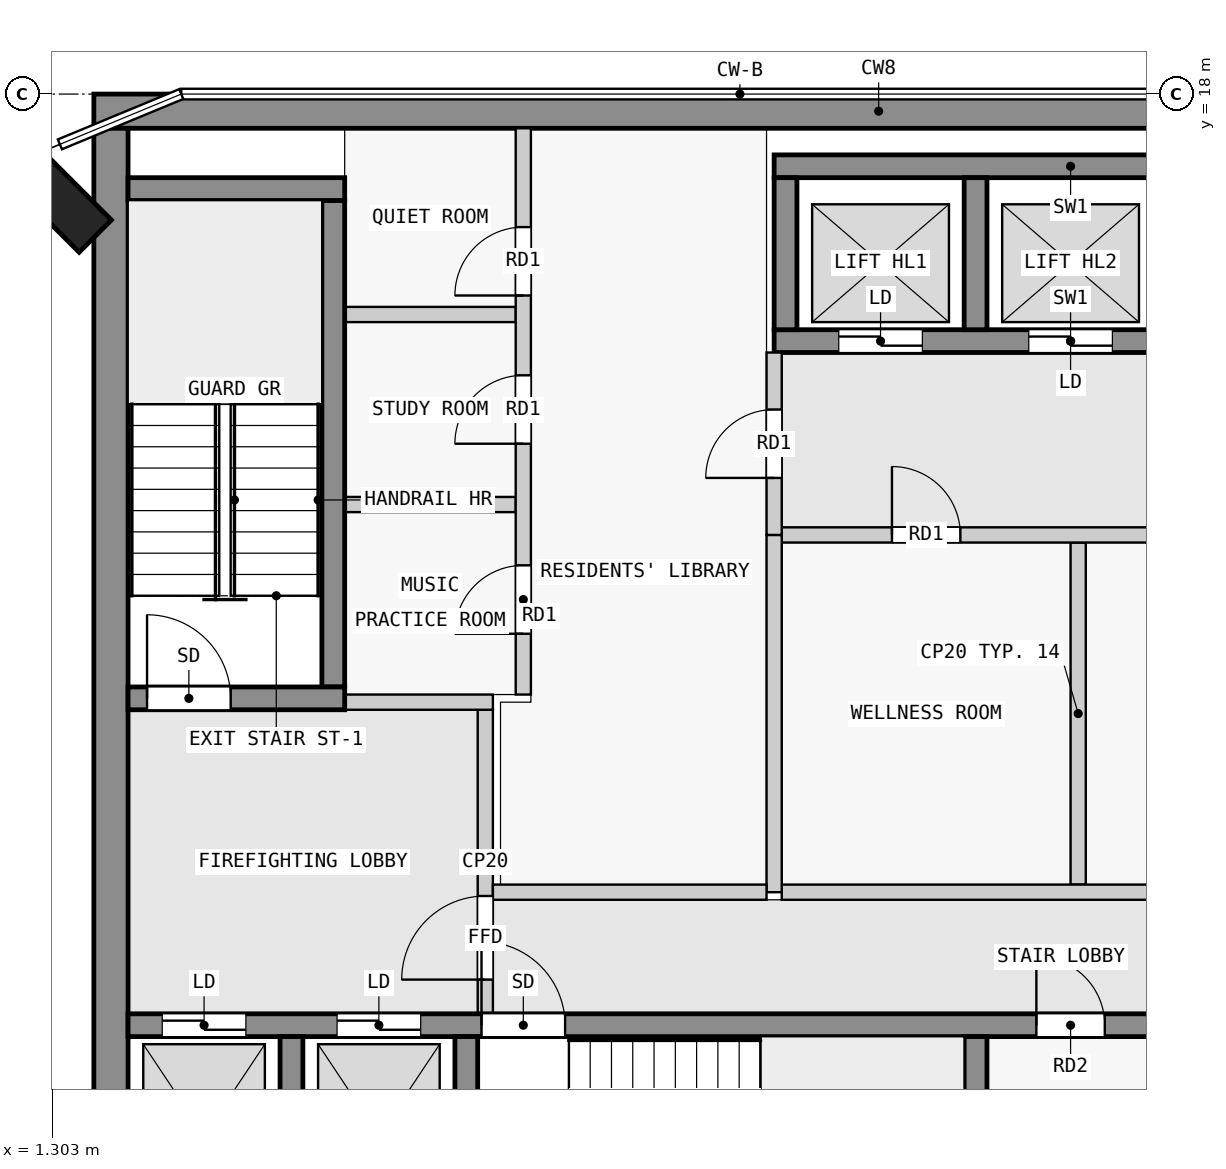
"""IFC4 building model, lengths in metres.
Left out: names, types, materials, properties, quantities, classifications, styles, units other than length and angle.
Written with IfcOpenShell. Run it as: python <this file> out.ifc"""

import sys

from ifc_helpers import new_model, si_unit, direction, frame, frame_2d, origin, origin_2d, place, context, subcontext, project, spatial, rectangle, extrude, element, fill, save


model = new_model("IFC4")
c1 = context("Model", 3, precision=1e-05, world=origin(), true_north=direction((0.0, 1.0)))
c2 = subcontext(c1, "Body", "Model", "MODEL_VIEW")
j1 = project(units=[si_unit("LENGTHUNIT", "METRE"), si_unit("PLANEANGLEUNIT", "RADIAN")], contexts=[c1])
p1 = place(None, origin())
s1 = spatial("IfcSite", under=j1, at=p1, CompositionType="ELEMENT")
p2 = place(p1, origin())
s2 = spatial("IfcBuilding", under=s1, at=p2, CompositionType="ELEMENT")
p3 = place(p2, frame((0.0, 0.0, 263.4)))
s3 = spatial("IfcBuildingStorey", under=s2, at=p3, CompositionType="ELEMENT", Elevation=263.4)
p4 = place(p3, frame((1.374, 16.626, 0.0), z_axis=(0.0, 0.0, 1.0), x_axis=(0.707106781187, 0.707106781187, 0.0)))
e1 = element("IfcColumn", 1, at=p4, inside=s3, PredefinedType="COLUMN", context=c2, shape_type="SweptSolid", body=[
    extrude(rectangle(XDim=0.6, YDim=1.4, at=origin_2d()), origin(), (0.0, 0.0, 1.0), 3.5),
])
p5 = place(p3, frame((1.85, 17.775, 0.0), z_axis=(0.0, 0.0, 1.0), x_axis=(1.0, 0.0, 0.0)))
e2 = element("IfcWall", 2, at=p5, inside=s3, PredefinedType="SHEAR", context=c2, shape_type="SweptSolid", body=[
    extrude(rectangle(XDim=20.65, YDim=0.45, at=frame_2d((10.325, 0.0))), origin(), (0.0, 0.0, 1.0), 3.25),
])
p6 = place(p3, frame((2.075, 2.5, 0.0), z_axis=(0.0, 0.0, 1.0), x_axis=(0.0, 1.0, 0.0)))
e3 = element("IfcWall", 3, at=p6, inside=s3, PredefinedType="SHEAR", context=c2, shape_type="SweptSolid", body=[
    extrude(rectangle(XDim=15.05, YDim=0.45, at=frame_2d((7.525, 0.0))), origin(), (0.0, 0.0, 1.0), 3.25),
])
for number, where, z_axis, x_axis in (
    (4, (4.45, 2.8, 0.0), (0.0, 0.0, 1.0), (0.0, 1.0, 0.0)),
    (5, (6.75, 2.8, 0.0), (0.0, 0.0, 1.0), (0.0, 1.0, 0.0)),
    (6, (13.45, 2.8, 0.0), (0.0, 0.0, 1.0), (0.0, 1.0, 0.0)),
):
    element("IfcWall", number, at=place(p3, frame(where, z_axis=z_axis, x_axis=x_axis)), inside=s3, PredefinedType="SHEAR", context=c2, shape_type="SweptSolid", body=[
        extrude(rectangle(XDim=2.8, YDim=0.3, at=frame_2d((1.4, 0.0))), origin(), (0.0, 0.0, 1.0), 3.25),
    ])
p7 = place(p3, frame((2.3, 5.75, 0.0), z_axis=(0.0, 0.0, 1.0), x_axis=(1.0, 0.0, 0.0)))
e7 = element("IfcWall", 7, at=p7, inside=s3, PredefinedType="SHEAR", context=c2, shape_type="SweptSolid", body=[
    extrude(rectangle(XDim=18.8, YDim=0.3, at=frame_2d((9.4, 0.0))), origin(), (0.0, 0.0, 1.0), 3.25),
])
p8 = place(p7, frame((4.65, 0.0, 0.0)))
e8 = element("IfcOpeningElement", 8, at=p8, cuts=e7, PredefinedType="OPENING", context=c2, shape_type="SweptSolid", body=[
    extrude(rectangle(XDim=1.1, YDim=2.1, at=frame_2d((0.55, 1.05))), frame((0.0, 0.16, 0.0), z_axis=(0.0, -1.0, 0.0), x_axis=(1.0, 0.0, 0.0)), (0.0, 0.0, 1.0), 0.32),
])
p9 = place(p7, frame((0.45, 0.0, 0.0)))
e9 = element("IfcOpeningElement", 9, at=p9, cuts=e7, PredefinedType="OPENING", context=c2, shape_type="SweptSolid", body=[
    extrude(rectangle(XDim=1.1, YDim=2.1, at=frame_2d((0.55, 1.05))), frame((0.0, 0.16, 0.0), z_axis=(0.0, -1.0, 0.0), x_axis=(1.0, 0.0, 0.0)), (0.0, 0.0, 1.0), 0.32),
])
p10 = place(p7, frame((2.75, 0.0, 0.0)))
e10 = element("IfcOpeningElement", 10, at=p10, cuts=e7, PredefinedType="OPENING", context=c2, shape_type="SweptSolid", body=[
    extrude(rectangle(XDim=1.1, YDim=2.1, at=frame_2d((0.55, 1.05))), frame((0.0, 0.16, 0.0), z_axis=(0.0, -1.0, 0.0), x_axis=(1.0, 0.0, 0.0)), (0.0, 0.0, 1.0), 0.32),
])
p11 = place(p7, frame((11.95, 0.0, 0.0)))
e11 = element("IfcOpeningElement", 11, at=p11, cuts=e7, PredefinedType="OPENING", context=c2, shape_type="SweptSolid", body=[
    extrude(rectangle(XDim=0.9, YDim=2.1, at=frame_2d((0.45, 1.05))), frame((0.0, 0.16, 0.0), z_axis=(0.0, -1.0, 0.0), x_axis=(1.0, 0.0, 0.0)), (0.0, 0.0, 1.0), 0.32),
])
p12 = place(p7, frame((15.7, 0.0, 0.0)))
e12 = element("IfcOpeningElement", 12, at=p12, cuts=e7, PredefinedType="OPENING", context=c2, shape_type="SweptSolid", body=[
    extrude(rectangle(XDim=0.9, YDim=2.1, at=frame_2d((0.45, 1.05))), frame((0.0, 0.16, 0.0), z_axis=(0.0, -1.0, 0.0), x_axis=(1.0, 0.0, 0.0)), (0.0, 0.0, 1.0), 0.32),
])
p13 = place(p3, frame((2.3, 10.05, 0.0), z_axis=(0.0, 0.0, 1.0), x_axis=(1.0, 0.0, 0.0)))
e13 = element("IfcWall", 13, at=p13, inside=s3, PredefinedType="SHEAR", context=c2, shape_type="SweptSolid", body=[
    extrude(rectangle(XDim=2.85, YDim=0.3, at=frame_2d((1.425, 0.0))), origin(), (0.0, 0.0, 1.0), 3.25),
])
p14 = place(p13, frame((0.25, 0.0, 0.0)))
e14 = element("IfcOpeningElement", 14, at=p14, cuts=e13, PredefinedType="OPENING", context=c2, shape_type="SweptSolid", body=[
    extrude(rectangle(XDim=1.1, YDim=2.1, at=frame_2d((0.55, 1.05))), frame((0.0, 0.16, 0.0), z_axis=(0.0, -1.0, 0.0), x_axis=(1.0, 0.0, 0.0)), (0.0, 0.0, 1.0), 0.32),
])
p15 = place(p3, frame((5.0, 10.2, 0.0), z_axis=(0.0, 0.0, 1.0), x_axis=(0.0, 1.0, 0.0)))
e15 = element("IfcWall", 15, at=p15, inside=s3, PredefinedType="SHEAR", context=c2, shape_type="SweptSolid", body=[
    extrude(rectangle(XDim=6.4, YDim=0.3, at=frame_2d((3.2, 0.0))), origin(), (0.0, 0.0, 1.0), 3.25),
])
p16 = place(p3, frame((2.3, 16.75, 0.0), z_axis=(0.0, 0.0, 1.0), x_axis=(1.0, 0.0, 0.0)))
e16 = element("IfcWall", 16, at=p16, inside=s3, PredefinedType="SHEAR", context=c2, shape_type="SweptSolid", body=[
    extrude(rectangle(XDim=2.85, YDim=0.3, at=frame_2d((1.425, 0.0))), origin(), (0.0, 0.0, 1.0), 3.25),
])
p17 = place(p3, frame((10.8, 17.05, 0.0), z_axis=(0.0, 0.0, 1.0), x_axis=(1.0, 0.0, 0.0)))
e17 = element("IfcWall", 17, at=p17, inside=s3, PredefinedType="SHEAR", context=c2, shape_type="SweptSolid", body=[
    extrude(rectangle(XDim=7.8, YDim=0.3, at=frame_2d((3.9, 0.0))), origin(), (0.0, 0.0, 1.0), 3.25),
])
p18 = place(p3, frame((10.8, 14.75, 0.0), z_axis=(0.0, 0.0, 1.0), x_axis=(1.0, 0.0, 0.0)))
e18 = element("IfcWall", 18, at=p18, inside=s3, PredefinedType="SHEAR", context=c2, shape_type="SweptSolid", body=[
    extrude(rectangle(XDim=7.8, YDim=0.3, at=frame_2d((3.9, 0.0))), origin(), (0.0, 0.0, 1.0), 3.25),
])
p19 = place(p18, frame((0.85, 0.0, 0.0)))
e19 = element("IfcOpeningElement", 19, at=p19, cuts=e18, PredefinedType="OPENING", context=c2, shape_type="SweptSolid", body=[
    extrude(rectangle(XDim=1.1, YDim=2.1, at=frame_2d((0.55, 1.05))), frame((0.0, 0.16, 0.0), z_axis=(0.0, -1.0, 0.0), x_axis=(1.0, 0.0, 0.0)), (0.0, 0.0, 1.0), 0.32),
])
p20 = place(p18, frame((3.35, 0.0, 0.0)))
e20 = element("IfcOpeningElement", 20, at=p20, cuts=e18, PredefinedType="OPENING", context=c2, shape_type="SweptSolid", body=[
    extrude(rectangle(XDim=1.1, YDim=2.1, at=frame_2d((0.55, 1.05))), frame((0.0, 0.16, 0.0), z_axis=(0.0, -1.0, 0.0), x_axis=(1.0, 0.0, 0.0)), (0.0, 0.0, 1.0), 0.32),
])
p21 = place(p18, frame((5.85, 0.0, 0.0)))
e21 = element("IfcOpeningElement", 21, at=p21, cuts=e18, PredefinedType="OPENING", context=c2, shape_type="SweptSolid", body=[
    extrude(rectangle(XDim=1.1, YDim=2.1, at=frame_2d((0.55, 1.05))), frame((0.0, 0.16, 0.0), z_axis=(0.0, -1.0, 0.0), x_axis=(1.0, 0.0, 0.0)), (0.0, 0.0, 1.0), 0.32),
])
for number, where, z_axis, x_axis in (
    (22, (10.95, 14.9, 0.0), (0.0, 0.0, 1.0), (0.0, 1.0, 0.0)),
    (23, (13.45, 14.9, 0.0), (0.0, 0.0, 1.0), (0.0, 1.0, 0.0)),
):
    element("IfcWall", number, at=place(p3, frame(where, z_axis=z_axis, x_axis=x_axis)), inside=s3, PredefinedType="SHEAR", context=c2, shape_type="SweptSolid", body=[
        extrude(rectangle(XDim=2.0, YDim=0.3, at=frame_2d((1.0, 0.0))), origin(), (0.0, 0.0, 1.0), 3.25),
    ])
p22 = place(p3, frame((7.0, 5.9, 0.0), z_axis=(0.0, 0.0, 1.0), x_axis=(0.0, 1.0, 0.0)))
e24 = element("IfcWall", 24, at=p22, inside=s3, PredefinedType="PARTITIONING", context=c2, shape_type="SweptSolid", body=[
    extrude(rectangle(XDim=4.0, YDim=0.2, at=frame_2d((2.0, 0.0))), origin(), (0.0, 0.0, 1.0), 3.25),
])
p23 = place(p22, frame((0.45, 0.0, 0.0)))
e25 = element("IfcOpeningElement", 25, at=p23, cuts=e24, PredefinedType="OPENING", context=c2, shape_type="SweptSolid", body=[
    extrude(rectangle(XDim=1.1, YDim=2.1, at=frame_2d((0.55, 1.05))), frame((0.0, 0.11, 0.0), z_axis=(0.0, -1.0, 0.0), x_axis=(1.0, 0.0, 0.0)), (0.0, 0.0, 1.0), 0.22),
])
p24 = place(p3, frame((5.15, 10.0, 0.0), z_axis=(0.0, 0.0, 1.0), x_axis=(1.0, 0.0, 0.0)))
e26 = element("IfcWall", 26, at=p24, inside=s3, PredefinedType="PARTITIONING", context=c2, shape_type="SweptSolid", body=[
    extrude(rectangle(XDim=1.95, YDim=0.2, at=frame_2d((0.975, 0.0))), origin(), (0.0, 0.0, 1.0), 3.25),
])
p25 = place(p3, frame((7.1, 7.5, 0.0), z_axis=(0.0, 0.0, 1.0), x_axis=(1.0, 0.0, 0.0)))
e27 = element("IfcWall", 27, at=p25, inside=s3, PredefinedType="PARTITIONING", context=c2, shape_type="SweptSolid", body=[
    extrude(rectangle(XDim=3.6, YDim=0.2, at=frame_2d((1.8, 0.0))), origin(), (0.0, 0.0, 1.0), 3.25),
])
p26 = place(p3, frame((10.8, 12.2, 0.0), z_axis=(0.0, 0.0, 1.0), x_axis=(0.0, 1.0, 0.0)))
e28 = element("IfcWall", 28, at=p26, inside=s3, PredefinedType="PARTITIONING", context=c2, shape_type="SweptSolid", body=[
    extrude(rectangle(XDim=2.4, YDim=0.2, at=frame_2d((1.2, 0.0))), origin(), (0.0, 0.0, 1.0), 3.25),
])
p27 = place(p26, frame((0.75, 0.0, 0.0)))
e29 = element("IfcOpeningElement", 29, at=p27, cuts=e28, PredefinedType="OPENING", context=c2, shape_type="SweptSolid", body=[
    extrude(rectangle(XDim=0.9, YDim=2.1, at=frame_2d((0.45, 1.05))), frame((0.0, 0.11, 0.0), z_axis=(0.0, -1.0, 0.0), x_axis=(1.0, 0.0, 0.0)), (0.0, 0.0, 1.0), 0.22),
])
p28 = place(p3, frame((10.8, 7.5, 0.0), z_axis=(0.0, 0.0, 1.0), x_axis=(0.0, 1.0, 0.0)))
e30 = element("IfcWall", 30, at=p28, inside=s3, PredefinedType="PARTITIONING", context=c2, shape_type="SweptSolid", body=[
    extrude(rectangle(XDim=4.7, YDim=0.2, at=frame_2d((2.35, 0.0))), origin(), (0.0, 0.0, 1.0), 3.25),
])
p29 = place(p3, frame((10.9, 7.5, 0.0), z_axis=(0.0, 0.0, 1.0), x_axis=(1.0, 0.0, 0.0)))
e31 = element("IfcWall", 31, at=p29, inside=s3, PredefinedType="PARTITIONING", context=c2, shape_type="SweptSolid", body=[
    extrude(rectangle(XDim=8.65, YDim=0.2, at=frame_2d((4.325, 0.0))), origin(), (0.0, 0.0, 1.0), 3.25),
])
p30 = place(p3, frame((10.9, 12.2, 0.0), z_axis=(0.0, 0.0, 1.0), x_axis=(1.0, 0.0, 0.0)))
e32 = element("IfcWall", 32, at=p30, inside=s3, PredefinedType="PARTITIONING", context=c2, shape_type="SweptSolid", body=[
    extrude(rectangle(XDim=8.65, YDim=0.2, at=frame_2d((4.325, 0.0))), origin(), (0.0, 0.0, 1.0), 3.25),
])
p31 = place(p30, frame((1.45, 0.0, 0.0)))
e33 = element("IfcOpeningElement", 33, at=p31, cuts=e32, PredefinedType="OPENING", context=c2, shape_type="SweptSolid", body=[
    extrude(rectangle(XDim=0.9, YDim=2.1, at=frame_2d((0.45, 1.05))), frame((0.0, 0.11, 0.0), z_axis=(0.0, -1.0, 0.0), x_axis=(1.0, 0.0, 0.0)), (0.0, 0.0, 1.0), 0.22),
])
p32 = place(p30, frame((5.875, 0.0, 0.0)))
e34 = element("IfcOpeningElement", 34, at=p32, cuts=e32, PredefinedType="OPENING", context=c2, shape_type="SweptSolid", body=[
    extrude(rectangle(XDim=0.9, YDim=2.1, at=frame_2d((0.45, 1.05))), frame((0.0, 0.11, 0.0), z_axis=(0.0, -1.0, 0.0), x_axis=(1.0, 0.0, 0.0)), (0.0, 0.0, 1.0), 0.22),
])
p33 = place(p3, frame((14.8, 7.6, 0.0), z_axis=(0.0, 0.0, 1.0), x_axis=(0.0, 1.0, 0.0)))
e35 = element("IfcWall", 35, at=p33, inside=s3, PredefinedType="PARTITIONING", context=c2, shape_type="SweptSolid", body=[
    extrude(rectangle(XDim=4.5, YDim=0.2, at=frame_2d((2.25, 0.0))), origin(), (0.0, 0.0, 1.0), 3.25),
])
p34 = place(p3, frame((7.5, 10.1, 0.0), z_axis=(0.0, 0.0, 1.0), x_axis=(0.0, 1.0, 0.0)))
e36 = element("IfcWall", 36, at=p34, inside=s3, PredefinedType="PARTITIONING", context=c2, shape_type="SweptSolid", body=[
    extrude(rectangle(XDim=7.45, YDim=0.2, at=frame_2d((3.725, 0.0))), origin(), (0.0, 0.0, 1.0), 3.25),
])
p35 = place(p34, frame((0.8, 0.0, 0.0)))
e37 = element("IfcOpeningElement", 37, at=p35, cuts=e36, PredefinedType="OPENING", context=c2, shape_type="SweptSolid", body=[
    extrude(rectangle(XDim=0.9, YDim=2.1, at=frame_2d((0.45, 1.05))), frame((0.0, 0.11, 0.0), z_axis=(0.0, -1.0, 0.0), x_axis=(1.0, 0.0, 0.0)), (0.0, 0.0, 1.0), 0.22),
])
p36 = place(p34, frame((3.3, 0.0, 0.0)))
e38 = element("IfcOpeningElement", 38, at=p36, cuts=e36, PredefinedType="OPENING", context=c2, shape_type="SweptSolid", body=[
    extrude(rectangle(XDim=0.9, YDim=2.1, at=frame_2d((0.45, 1.05))), frame((0.0, 0.11, 0.0), z_axis=(0.0, -1.0, 0.0), x_axis=(1.0, 0.0, 0.0)), (0.0, 0.0, 1.0), 0.22),
])
p37 = place(p34, frame((5.25, 0.0, 0.0)))
e39 = element("IfcOpeningElement", 39, at=p37, cuts=e36, PredefinedType="OPENING", context=c2, shape_type="SweptSolid", body=[
    extrude(rectangle(XDim=0.9, YDim=2.1, at=frame_2d((0.45, 1.05))), frame((0.0, 0.11, 0.0), z_axis=(0.0, -1.0, 0.0), x_axis=(1.0, 0.0, 0.0)), (0.0, 0.0, 1.0), 0.22),
])
for number, where, z_axis, x_axis in (
    (40, (5.15, 12.6, 0.0), (0.0, 0.0, 1.0), (1.0, 0.0, 0.0)),
    (41, (5.15, 15.1, 0.0), (0.0, 0.0, 1.0), (1.0, 0.0, 0.0)),
):
    element("IfcWall", number, at=place(p3, frame(where, z_axis=z_axis, x_axis=x_axis)), inside=s3, PredefinedType="PARTITIONING", context=c2, shape_type="SweptSolid", body=[
        extrude(rectangle(XDim=2.25, YDim=0.2, at=frame_2d((1.125, 0.0))), origin(), (0.0, 0.0, 1.0), 3.25),
    ])
p38 = place(p23, origin())
e42 = element("IfcDoor", 42, at=p38, inside=s3, OperationType="SINGLE_SWING_LEFT", PredefinedType="DOOR", context=c2, shape_type="SweptSolid", body=[
    extrude(rectangle(XDim=1.1, YDim=2.1, at=frame_2d((0.55, 1.05))), frame((0.0, 0.025, 0.0), z_axis=(0.0, -1.0, 0.0), x_axis=(1.0, 0.0, 0.0)), (0.0, 0.0, 1.0), 0.05),
])
fill(e25, e42)
p39 = place(p14, origin())
e43 = element("IfcDoor", 43, at=p39, inside=s3, OperationType="SINGLE_SWING_RIGHT", PredefinedType="DOOR", context=c2, shape_type="SweptSolid", body=[
    extrude(rectangle(XDim=1.1, YDim=2.1, at=frame_2d((0.55, 1.05))), frame((0.0, 0.025, 0.0), z_axis=(0.0, -1.0, 0.0), x_axis=(1.0, 0.0, 0.0)), (0.0, 0.0, 1.0), 0.05),
])
fill(e14, e43)
p40 = place(p27, origin())
e44 = element("IfcDoor", 44, at=p40, inside=s3, OperationType="SINGLE_SWING_LEFT", PredefinedType="DOOR", context=c2, shape_type="SweptSolid", body=[
    extrude(rectangle(XDim=0.9, YDim=2.1, at=frame_2d((0.45, 1.05))), frame((0.0, 0.025, 0.0), z_axis=(0.0, -1.0, 0.0), x_axis=(1.0, 0.0, 0.0)), (0.0, 0.0, 1.0), 0.05),
])
fill(e29, e44)
p41 = place(p31, origin())
e45 = element("IfcDoor", 45, at=p41, inside=s3, OperationType="SINGLE_SWING_LEFT", PredefinedType="DOOR", context=c2, shape_type="SweptSolid", body=[
    extrude(rectangle(XDim=0.9, YDim=2.1, at=frame_2d((0.45, 1.05))), frame((0.0, 0.025, 0.0), z_axis=(0.0, -1.0, 0.0), x_axis=(1.0, 0.0, 0.0)), (0.0, 0.0, 1.0), 0.05),
])
fill(e33, e45)
p42 = place(p8, origin())
e46 = element("IfcDoor", 46, at=p42, inside=s3, OperationType="SINGLE_SWING_LEFT", PredefinedType="DOOR", context=c2, shape_type="SweptSolid", body=[
    extrude(rectangle(XDim=1.1, YDim=2.1, at=frame_2d((0.55, 1.05))), frame((0.0, 0.025, 0.0), z_axis=(0.0, -1.0, 0.0), x_axis=(1.0, 0.0, 0.0)), (0.0, 0.0, 1.0), 0.05),
])
fill(e8, e46)
p43 = place(p9, origin())
e47 = element("IfcDoor", 47, at=p43, inside=s3, OperationType="DOUBLE_DOOR_SLIDING", PredefinedType="DOOR", context=c2, shape_type="SweptSolid", body=[
    extrude(rectangle(XDim=1.1, YDim=2.1, at=frame_2d((0.55, 1.05))), frame((0.0, 0.025, 0.0), z_axis=(0.0, -1.0, 0.0), x_axis=(1.0, 0.0, 0.0)), (0.0, 0.0, 1.0), 0.05),
])
fill(e9, e47)
p44 = place(p10, origin())
e48 = element("IfcDoor", 48, at=p44, inside=s3, OperationType="DOUBLE_DOOR_SLIDING", PredefinedType="DOOR", context=c2, shape_type="SweptSolid", body=[
    extrude(rectangle(XDim=1.1, YDim=2.1, at=frame_2d((0.55, 1.05))), frame((0.0, 0.025, 0.0), z_axis=(0.0, -1.0, 0.0), x_axis=(1.0, 0.0, 0.0)), (0.0, 0.0, 1.0), 0.05),
])
fill(e10, e48)
p45 = place(p19, origin())
e49 = element("IfcDoor", 49, at=p45, inside=s3, OperationType="DOUBLE_DOOR_SLIDING", PredefinedType="DOOR", context=c2, shape_type="SweptSolid", body=[
    extrude(rectangle(XDim=1.1, YDim=2.1, at=frame_2d((0.55, 1.05))), frame((0.0, 0.025, 0.0), z_axis=(0.0, -1.0, 0.0), x_axis=(1.0, 0.0, 0.0)), (0.0, 0.0, 1.0), 0.05),
])
fill(e19, e49)
p46 = place(p20, origin())
e50 = element("IfcDoor", 50, at=p46, inside=s3, OperationType="DOUBLE_DOOR_SLIDING", PredefinedType="DOOR", context=c2, shape_type="SweptSolid", body=[
    extrude(rectangle(XDim=1.1, YDim=2.1, at=frame_2d((0.55, 1.05))), frame((0.0, 0.025, 0.0), z_axis=(0.0, -1.0, 0.0), x_axis=(1.0, 0.0, 0.0)), (0.0, 0.0, 1.0), 0.05),
])
fill(e20, e50)
p47 = place(p35, origin())
e51 = element("IfcDoor", 51, at=p47, inside=s3, OperationType="SINGLE_SWING_RIGHT", PredefinedType="DOOR", context=c2, shape_type="SweptSolid", body=[
    extrude(rectangle(XDim=0.9, YDim=2.1, at=frame_2d((0.45, 1.05))), frame((0.0, 0.025, 0.0), z_axis=(0.0, -1.0, 0.0), x_axis=(1.0, 0.0, 0.0)), (0.0, 0.0, 1.0), 0.05),
])
fill(e37, e51)
p48 = place(p36, origin())
e52 = element("IfcDoor", 52, at=p48, inside=s3, OperationType="SINGLE_SWING_RIGHT", PredefinedType="DOOR", context=c2, shape_type="SweptSolid", body=[
    extrude(rectangle(XDim=0.9, YDim=2.1, at=frame_2d((0.45, 1.05))), frame((0.0, 0.025, 0.0), z_axis=(0.0, -1.0, 0.0), x_axis=(1.0, 0.0, 0.0)), (0.0, 0.0, 1.0), 0.05),
])
fill(e38, e52)
p49 = place(p37, origin())
e53 = element("IfcDoor", 53, at=p49, inside=s3, OperationType="SINGLE_SWING_RIGHT", PredefinedType="DOOR", context=c2, shape_type="SweptSolid", body=[
    extrude(rectangle(XDim=0.9, YDim=2.1, at=frame_2d((0.45, 1.05))), frame((0.0, 0.025, 0.0), z_axis=(0.0, -1.0, 0.0), x_axis=(1.0, 0.0, 0.0)), (0.0, 0.0, 1.0), 0.05),
])
fill(e39, e53)
p50 = place(p11, origin())
e54 = element("IfcDoor", 54, at=p50, inside=s3, OperationType="SINGLE_SWING_LEFT", PredefinedType="DOOR", context=c2, shape_type="SweptSolid", body=[
    extrude(rectangle(XDim=0.9, YDim=2.1, at=frame_2d((0.45, 1.05))), frame((0.0, 0.025, 0.0), z_axis=(0.0, -1.0, 0.0), x_axis=(1.0, 0.0, 0.0)), (0.0, 0.0, 1.0), 0.05),
])
fill(e11, e54)
save(model, sys.argv[1])
